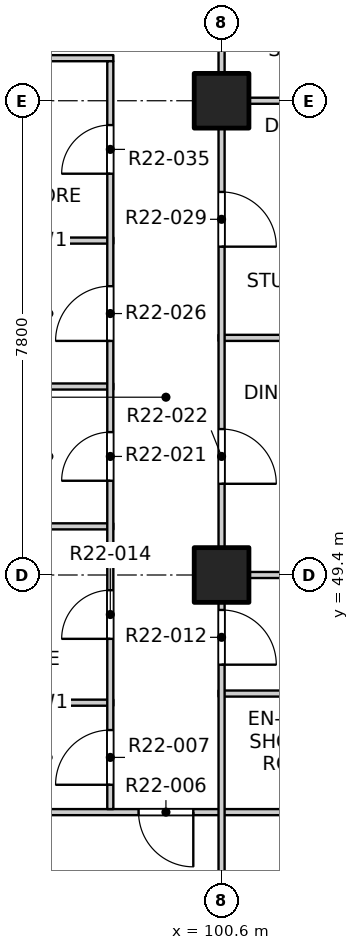
"""IFC4 building model, lengths in metres.
Left out: names, types, materials, properties, quantities, classifications, styles, units other than length and angle.
Written with IfcOpenShell. Run it as: python <this file> out.ifc"""

import sys

from ifc_helpers import new_model, si_unit, direction, frame, frame_2d, origin, origin_2d, place, context, subcontext, project, spatial, rectangle, extrude, element, fill, save


model = new_model("IFC4")
c1 = context("Model", 3, precision=1e-05, world=origin(), true_north=direction((0.0, 1.0)))
c2 = subcontext(c1, "Body", "Model", "MODEL_VIEW")
j1 = project(units=[si_unit("LENGTHUNIT", "METRE"), si_unit("PLANEANGLEUNIT", "RADIAN")], contexts=[c1])
p1 = place(None, origin())
s1 = spatial("IfcSite", under=j1, at=p1, CompositionType="ELEMENT")
p2 = place(p1, origin())
s2 = spatial("IfcBuilding", under=s1, at=p2, CompositionType="ELEMENT")
p3 = place(p2, frame((0.0, 0.0, 224.5)))
s3 = spatial("IfcBuildingStorey", under=s2, at=p3, CompositionType="ELEMENT", Elevation=224.5)
for number, where, z_axis, x_axis in (
    (1, (100.6, 49.4, -0.25), (0.0, 0.0, 1.0), (1.0, 0.0, 0.0)),
    (2, (100.6, 57.2, -0.25), (0.0, 0.0, 1.0), (1.0, 0.0, 0.0)),
):
    element("IfcColumn", number, at=place(p3, frame(where, z_axis=z_axis, x_axis=x_axis)), inside=s3, PredefinedType="COLUMN", context=c2, shape_type="SweptSolid", body=[
        extrude(rectangle(XDim=0.9, YDim=0.9, at=origin_2d()), origin(), (0.0, 0.0, 1.0), 3.4),
    ])
p4 = place(p3, frame((96.625, 45.5, 0.0), z_axis=(0.0, 0.0, 1.0), x_axis=(1.0, 0.0, 0.0)))
e3 = element("IfcWall", 3, at=p4, inside=s3, PredefinedType="PARTITIONING", context=c2, shape_type="SweptSolid", body=[
    extrude(rectangle(XDim=11.475, YDim=0.1, at=frame_2d((5.738, 0.0))), origin(), (0.0, 0.0, 1.0), 3.15),
])
p5 = place(p4, frame((2.61, 0.0, 0.0)))
e4 = element("IfcOpeningElement", 4, at=p5, cuts=e3, PredefinedType="OPENING", context=c2, shape_type="SweptSolid", body=[
    extrude(rectangle(XDim=0.9, YDim=2.1, at=frame_2d((0.45, 1.05))), frame((0.0, 0.06, 0.0), z_axis=(0.0, -1.0, 0.0), x_axis=(1.0, 0.0, 0.0)), (0.0, 0.0, 1.0), 0.12),
])
p6 = place(p3, frame((96.625, 47.3, 0.0), z_axis=(0.0, 0.0, 1.0), x_axis=(1.0, 0.0, 0.0)))
e5 = element("IfcWall", 5, at=p6, inside=s3, PredefinedType="PARTITIONING", context=c2, shape_type="SweptSolid", body=[
    extrude(rectangle(XDim=2.195, YDim=0.1, at=frame_2d((1.098, 0.0))), origin(), (0.0, 0.0, 1.0), 3.15),
])
p7 = place(p3, frame((100.55, 47.45, 0.0), z_axis=(0.0, 0.0, 1.0), x_axis=(1.0, 0.0, 0.0)))
e6 = element("IfcWall", 6, at=p7, inside=s3, PredefinedType="PARTITIONING", context=c2, shape_type="SweptSolid", body=[
    extrude(rectangle(XDim=3.7, YDim=0.1, at=frame_2d((1.85, 0.0))), origin(), (0.0, 0.0, 1.0), 3.15),
])
p8 = place(p3, frame((100.55, 49.4, 0.0), z_axis=(0.0, 0.0, 1.0), x_axis=(1.0, 0.0, 0.0)))
e7 = element("IfcWall", 7, at=p8, inside=s3, PredefinedType="PARTITIONING", context=c2, shape_type="SweptSolid", body=[
    extrude(rectangle(XDim=7.55, YDim=0.1, at=frame_2d((3.775, 0.0))), origin(), (0.0, 0.0, 1.0), 3.15),
])
for number, where, z_axis, x_axis in (
    (8, (96.6, 50.2, 0.0), (0.0, 0.0, 1.0), (1.0, 0.0, 0.0)),
    (9, (96.6, 52.5, 0.0), (0.0, 0.0, 1.0), (1.0, 0.0, 0.0)),
):
    element("IfcWall", number, at=place(p3, frame(where, z_axis=z_axis, x_axis=x_axis)), inside=s3, PredefinedType="PARTITIONING", context=c2, shape_type="SweptSolid", body=[
        extrude(rectangle(XDim=2.22, YDim=0.1, at=frame_2d((1.11, 0.0))), origin(), (0.0, 0.0, 1.0), 3.15),
    ])
p9 = place(p3, frame((100.55, 53.3, 0.0), z_axis=(0.0, 0.0, 1.0), x_axis=(1.0, 0.0, 0.0)))
e10 = element("IfcWall", 10, at=p9, inside=s3, PredefinedType="PARTITIONING", context=c2, shape_type="SweptSolid", body=[
    extrude(rectangle(XDim=7.55, YDim=0.1, at=frame_2d((3.775, 0.0))), origin(), (0.0, 0.0, 1.0), 3.15),
])
p10 = place(p3, frame((96.6, 54.9, 0.0), z_axis=(0.0, 0.0, 1.0), x_axis=(1.0, 0.0, 0.0)))
e11 = element("IfcWall", 11, at=p10, inside=s3, PredefinedType="PARTITIONING", context=c2, shape_type="SweptSolid", body=[
    extrude(rectangle(XDim=2.22, YDim=0.1, at=frame_2d((1.11, 0.0))), origin(), (0.0, 0.0, 1.0), 3.15),
])
p11 = place(p3, frame((100.55, 57.2, 0.0), z_axis=(0.0, 0.0, 1.0), x_axis=(1.0, 0.0, 0.0)))
e12 = element("IfcWall", 12, at=p11, inside=s3, PredefinedType="PARTITIONING", context=c2, shape_type="SweptSolid", body=[
    extrude(rectangle(XDim=7.55, YDim=0.1, at=frame_2d((3.775, 0.0))), origin(), (0.0, 0.0, 1.0), 3.15),
])
p12 = place(p3, frame((96.6, 57.9, 0.0), z_axis=(0.0, 0.0, 1.0), x_axis=(1.0, 0.0, 0.0)))
e13 = element("IfcWall", 13, at=p12, inside=s3, PredefinedType="PARTITIONING", context=c2, shape_type="SweptSolid", body=[
    extrude(rectangle(XDim=2.22, YDim=0.1, at=frame_2d((1.11, 0.0))), origin(), (0.0, 0.0, 1.0), 3.15),
])
p13 = place(p3, frame((98.77, 45.55, 0.0), z_axis=(0.0, 0.0, 1.0), x_axis=(0.0, 1.0, 0.0)))
e14 = element("IfcWall", 14, at=p13, inside=s3, PredefinedType="PARTITIONING", context=c2, shape_type="SweptSolid", body=[
    extrude(rectangle(XDim=12.3, YDim=0.1, at=frame_2d((6.15, 0.0))), origin(), (0.0, 0.0, 1.0), 3.15),
])
p14 = place(p13, frame((0.4, 0.0, 0.0)))
e15 = element("IfcOpeningElement", 15, at=p14, cuts=e14, PredefinedType="OPENING", context=c2, shape_type="SweptSolid", body=[
    extrude(rectangle(XDim=0.9, YDim=2.1, at=frame_2d((0.45, 1.05))), frame((0.0, 0.06, 0.0), z_axis=(0.0, -1.0, 0.0), x_axis=(1.0, 0.0, 0.0)), (0.0, 0.0, 1.0), 0.12),
])
p15 = place(p13, frame((2.8, 0.0, 0.0)))
e16 = element("IfcOpeningElement", 16, at=p15, cuts=e14, PredefinedType="OPENING", context=c2, shape_type="SweptSolid", body=[
    extrude(rectangle(XDim=0.8, YDim=2.1, at=frame_2d((0.4, 1.05))), frame((0.0, 0.06, 0.0), z_axis=(0.0, -1.0, 0.0), x_axis=(1.0, 0.0, 0.0)), (0.0, 0.0, 1.0), 0.12),
])
p16 = place(p13, frame((5.4, 0.0, 0.0)))
e17 = element("IfcOpeningElement", 17, at=p16, cuts=e14, PredefinedType="OPENING", context=c2, shape_type="SweptSolid", body=[
    extrude(rectangle(XDim=0.8, YDim=2.1, at=frame_2d((0.4, 1.05))), frame((0.0, 0.06, 0.0), z_axis=(0.0, -1.0, 0.0), x_axis=(1.0, 0.0, 0.0)), (0.0, 0.0, 1.0), 0.12),
])
p17 = place(p13, frame((7.7, 0.0, 0.0)))
e18 = element("IfcOpeningElement", 18, at=p17, cuts=e14, PredefinedType="OPENING", context=c2, shape_type="SweptSolid", body=[
    extrude(rectangle(XDim=0.9, YDim=2.1, at=frame_2d((0.45, 1.05))), frame((0.0, 0.06, 0.0), z_axis=(0.0, -1.0, 0.0), x_axis=(1.0, 0.0, 0.0)), (0.0, 0.0, 1.0), 0.12),
])
p18 = place(p13, frame((10.45, 0.0, 0.0)))
e19 = element("IfcOpeningElement", 19, at=p18, cuts=e14, PredefinedType="OPENING", context=c2, shape_type="SweptSolid", body=[
    extrude(rectangle(XDim=0.8, YDim=2.1, at=frame_2d((0.4, 1.05))), frame((0.0, 0.06, 0.0), z_axis=(0.0, -1.0, 0.0), x_axis=(1.0, 0.0, 0.0)), (0.0, 0.0, 1.0), 0.12),
])
p19 = place(p3, frame((100.6, 41.9, 0.0), z_axis=(0.0, 0.0, 1.0), x_axis=(0.0, 1.0, 0.0)))
e20 = element("IfcWall", 20, at=p19, inside=s3, PredefinedType="PARTITIONING", context=c2, shape_type="SweptSolid", body=[
    extrude(rectangle(XDim=46.2, YDim=0.1, at=frame_2d((23.1, 0.0))), origin(), (0.0, 0.0, 1.0), 3.15),
])
p20 = place(p19, frame((1.2, 0.0, 0.0)))
e21 = element("IfcOpeningElement", 21, at=p20, cuts=e20, PredefinedType="OPENING", context=c2, shape_type="SweptSolid", body=[
    extrude(rectangle(XDim=0.9, YDim=2.1, at=frame_2d((0.45, 1.05))), frame((0.0, 0.06, 0.0), z_axis=(0.0, -1.0, 0.0), x_axis=(1.0, 0.0, 0.0)), (0.0, 0.0, 1.0), 0.12),
])
p21 = place(p19, frame((6.025, 0.0, 0.0)))
e22 = element("IfcOpeningElement", 22, at=p21, cuts=e20, PredefinedType="OPENING", context=c2, shape_type="SweptSolid", body=[
    extrude(rectangle(XDim=0.9, YDim=2.1, at=frame_2d((0.45, 1.05))), frame((0.0, 0.06, 0.0), z_axis=(0.0, -1.0, 0.0), x_axis=(1.0, 0.0, 0.0)), (0.0, 0.0, 1.0), 0.12),
])
p22 = place(p19, frame((9.0, 0.0, 0.0)))
e23 = element("IfcOpeningElement", 23, at=p22, cuts=e20, PredefinedType="OPENING", context=c2, shape_type="SweptSolid", body=[
    extrude(rectangle(XDim=0.9, YDim=2.1, at=frame_2d((0.45, 1.05))), frame((0.0, 0.06, 0.0), z_axis=(0.0, -1.0, 0.0), x_axis=(1.0, 0.0, 0.0)), (0.0, 0.0, 1.0), 0.12),
])
p23 = place(p19, frame((12.9, 0.0, 0.0)))
e24 = element("IfcOpeningElement", 24, at=p23, cuts=e20, PredefinedType="OPENING", context=c2, shape_type="SweptSolid", body=[
    extrude(rectangle(XDim=0.9, YDim=2.1, at=frame_2d((0.45, 1.05))), frame((0.0, 0.06, 0.0), z_axis=(0.0, -1.0, 0.0), x_axis=(1.0, 0.0, 0.0)), (0.0, 0.0, 1.0), 0.12),
])
p24 = place(p19, frame((17.775, 0.0, 0.0)))
e25 = element("IfcOpeningElement", 25, at=p24, cuts=e20, PredefinedType="OPENING", context=c2, shape_type="SweptSolid", body=[
    extrude(rectangle(XDim=0.9, YDim=2.1, at=frame_2d((0.45, 1.05))), frame((0.0, 0.06, 0.0), z_axis=(0.0, -1.0, 0.0), x_axis=(1.0, 0.0, 0.0)), (0.0, 0.0, 1.0), 0.12),
])
p25 = place(p19, frame((21.625, 0.0, 0.0)))
e26 = element("IfcOpeningElement", 26, at=p25, cuts=e20, PredefinedType="OPENING", context=c2, shape_type="SweptSolid", body=[
    extrude(rectangle(XDim=0.9, YDim=2.1, at=frame_2d((0.45, 1.05))), frame((0.0, 0.06, 0.0), z_axis=(0.0, -1.0, 0.0), x_axis=(1.0, 0.0, 0.0)), (0.0, 0.0, 1.0), 0.12),
])
p26 = place(p19, frame((25.575, 0.0, 0.0)))
e27 = element("IfcOpeningElement", 27, at=p26, cuts=e20, PredefinedType="OPENING", context=c2, shape_type="SweptSolid", body=[
    extrude(rectangle(XDim=0.9, YDim=2.1, at=frame_2d((0.45, 1.05))), frame((0.0, 0.06, 0.0), z_axis=(0.0, -1.0, 0.0), x_axis=(1.0, 0.0, 0.0)), (0.0, 0.0, 1.0), 0.12),
])
p27 = place(p19, frame((28.5, 0.0, 0.0)))
e28 = element("IfcOpeningElement", 28, at=p27, cuts=e20, PredefinedType="OPENING", context=c2, shape_type="SweptSolid", body=[
    extrude(rectangle(XDim=0.9, YDim=2.1, at=frame_2d((0.45, 1.05))), frame((0.0, 0.06, 0.0), z_axis=(0.0, -1.0, 0.0), x_axis=(1.0, 0.0, 0.0)), (0.0, 0.0, 1.0), 0.12),
])
p28 = place(p19, frame((33.375, 0.0, 0.0)))
e29 = element("IfcOpeningElement", 29, at=p28, cuts=e20, PredefinedType="OPENING", context=c2, shape_type="SweptSolid", body=[
    extrude(rectangle(XDim=0.9, YDim=2.1, at=frame_2d((0.45, 1.05))), frame((0.0, 0.06, 0.0), z_axis=(0.0, -1.0, 0.0), x_axis=(1.0, 0.0, 0.0)), (0.0, 0.0, 1.0), 0.12),
])
p29 = place(p19, frame((36.3, 0.0, 0.0)))
e30 = element("IfcOpeningElement", 30, at=p29, cuts=e20, PredefinedType="OPENING", context=c2, shape_type="SweptSolid", body=[
    extrude(rectangle(XDim=0.9, YDim=2.1, at=frame_2d((0.45, 1.05))), frame((0.0, 0.06, 0.0), z_axis=(0.0, -1.0, 0.0), x_axis=(1.0, 0.0, 0.0)), (0.0, 0.0, 1.0), 0.12),
])
p30 = place(p19, frame((40.2, 0.0, 0.0)))
e31 = element("IfcOpeningElement", 31, at=p30, cuts=e20, PredefinedType="OPENING", context=c2, shape_type="SweptSolid", body=[
    extrude(rectangle(XDim=0.9, YDim=2.1, at=frame_2d((0.45, 1.05))), frame((0.0, 0.06, 0.0), z_axis=(0.0, -1.0, 0.0), x_axis=(1.0, 0.0, 0.0)), (0.0, 0.0, 1.0), 0.12),
])
p31 = place(p19, frame((44.1, 0.0, 0.0)))
e32 = element("IfcOpeningElement", 32, at=p31, cuts=e20, PredefinedType="OPENING", context=c2, shape_type="SweptSolid", body=[
    extrude(rectangle(XDim=0.9, YDim=2.1, at=frame_2d((0.45, 1.05))), frame((0.0, 0.06, 0.0), z_axis=(0.0, -1.0, 0.0), x_axis=(1.0, 0.0, 0.0)), (0.0, 0.0, 1.0), 0.12),
])
p32 = place(p5, origin())
e33 = element("IfcDoor", 33, at=p32, inside=s3, OperationType="SINGLE_SWING_LEFT", PredefinedType="DOOR", context=c2, shape_type="SweptSolid", body=[
    extrude(rectangle(XDim=0.9, YDim=2.1, at=frame_2d((0.45, 1.05))), frame((0.0, 0.025, 0.0), z_axis=(0.0, -1.0, 0.0), x_axis=(1.0, 0.0, 0.0)), (0.0, 0.0, 1.0), 0.05),
])
fill(e4, e33)
p33 = place(p14, origin())
e34 = element("IfcDoor", 34, at=p33, inside=s3, OperationType="SINGLE_SWING_LEFT", PredefinedType="DOOR", context=c2, shape_type="SweptSolid", body=[
    extrude(rectangle(XDim=0.9, YDim=2.1, at=frame_2d((0.45, 1.05))), frame((0.0, 0.025, 0.0), z_axis=(0.0, -1.0, 0.0), x_axis=(1.0, 0.0, 0.0)), (0.0, 0.0, 1.0), 0.05),
])
fill(e15, e34)
p34 = place(p21, origin())
e35 = element("IfcDoor", 35, at=p34, inside=s3, OperationType="SINGLE_SWING_RIGHT", PredefinedType="DOOR", context=c2, shape_type="SweptSolid", body=[
    extrude(rectangle(XDim=0.9, YDim=2.1, at=frame_2d((0.45, 1.05))), frame((0.0, 0.025, 0.0), z_axis=(0.0, -1.0, 0.0), x_axis=(1.0, 0.0, 0.0)), (0.0, 0.0, 1.0), 0.05),
])
fill(e22, e35)
p35 = place(p15, origin())
e36 = element("IfcDoor", 36, at=p35, inside=s3, OperationType="SINGLE_SWING_LEFT", PredefinedType="DOOR", context=c2, shape_type="SweptSolid", body=[
    extrude(rectangle(XDim=0.8, YDim=2.1, at=frame_2d((0.4, 1.05))), frame((0.0, 0.025, 0.0), z_axis=(0.0, -1.0, 0.0), x_axis=(1.0, 0.0, 0.0)), (0.0, 0.0, 1.0), 0.05),
])
fill(e16, e36)
p36 = place(p16, origin())
e37 = element("IfcDoor", 37, at=p36, inside=s3, OperationType="SINGLE_SWING_LEFT", PredefinedType="DOOR", context=c2, shape_type="SweptSolid", body=[
    extrude(rectangle(XDim=0.8, YDim=2.1, at=frame_2d((0.4, 1.05))), frame((0.0, 0.025, 0.0), z_axis=(0.0, -1.0, 0.0), x_axis=(1.0, 0.0, 0.0)), (0.0, 0.0, 1.0), 0.05),
])
fill(e17, e37)
p37 = place(p22, origin())
e38 = element("IfcDoor", 38, at=p37, inside=s3, OperationType="SINGLE_SWING_RIGHT", PredefinedType="DOOR", context=c2, shape_type="SweptSolid", body=[
    extrude(rectangle(XDim=0.9, YDim=2.1, at=frame_2d((0.45, 1.05))), frame((0.0, 0.025, 0.0), z_axis=(0.0, -1.0, 0.0), x_axis=(1.0, 0.0, 0.0)), (0.0, 0.0, 1.0), 0.05),
])
fill(e23, e38)
p38 = place(p17, origin())
e39 = element("IfcDoor", 39, at=p38, inside=s3, OperationType="SINGLE_SWING_LEFT", PredefinedType="DOOR", context=c2, shape_type="SweptSolid", body=[
    extrude(rectangle(XDim=0.9, YDim=2.1, at=frame_2d((0.45, 1.05))), frame((0.0, 0.025, 0.0), z_axis=(0.0, -1.0, 0.0), x_axis=(1.0, 0.0, 0.0)), (0.0, 0.0, 1.0), 0.05),
])
fill(e18, e39)
p39 = place(p23, origin())
e40 = element("IfcDoor", 40, at=p39, inside=s3, OperationType="SINGLE_SWING_RIGHT", PredefinedType="DOOR", context=c2, shape_type="SweptSolid", body=[
    extrude(rectangle(XDim=0.9, YDim=2.1, at=frame_2d((0.45, 1.05))), frame((0.0, 0.025, 0.0), z_axis=(0.0, -1.0, 0.0), x_axis=(1.0, 0.0, 0.0)), (0.0, 0.0, 1.0), 0.05),
])
fill(e24, e40)
p40 = place(p18, origin())
e41 = element("IfcDoor", 41, at=p40, inside=s3, OperationType="SINGLE_SWING_LEFT", PredefinedType="DOOR", context=c2, shape_type="SweptSolid", body=[
    extrude(rectangle(XDim=0.8, YDim=2.1, at=frame_2d((0.4, 1.05))), frame((0.0, 0.025, 0.0), z_axis=(0.0, -1.0, 0.0), x_axis=(1.0, 0.0, 0.0)), (0.0, 0.0, 1.0), 0.05),
])
fill(e19, e41)
save(model, sys.argv[1])
